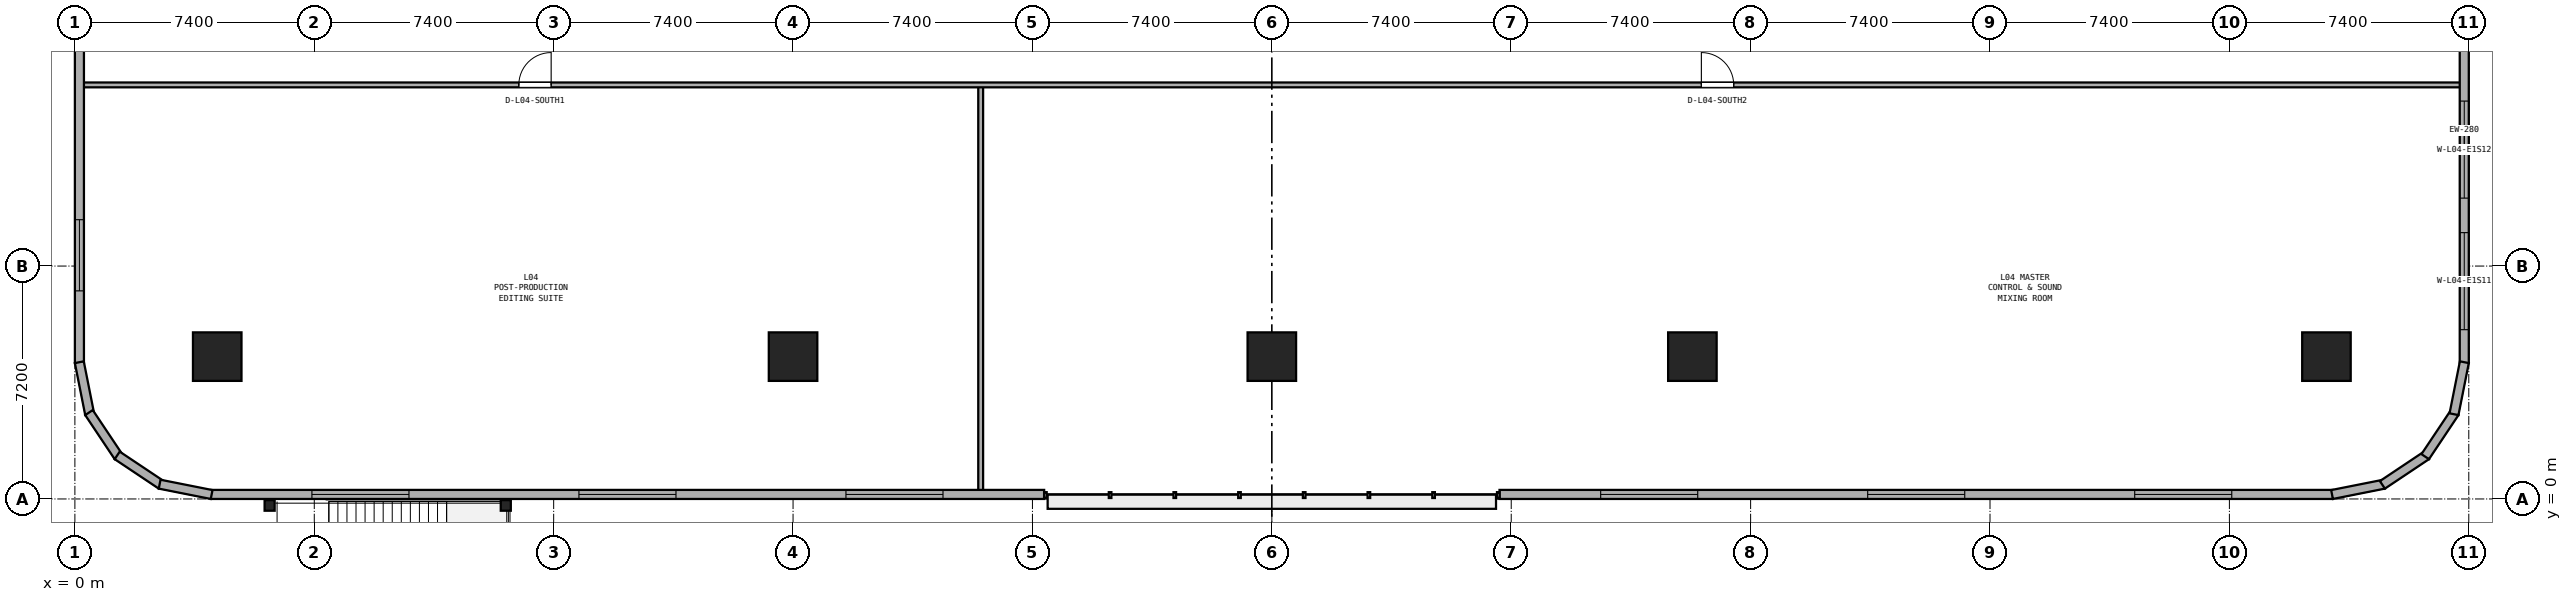
"""IFC4 building model, lengths in metres.
Left out: names, types, materials, properties, quantities, classifications, styles, units other than length and angle.
Written with IfcOpenShell. Run it as: python <this file> out.ifc"""

import sys

from ifc_helpers import new_model, si_unit, direction, frame, frame_2d, origin, origin_2d, place, context, subcontext, project, spatial, rectangle, i_section, extrude, element, fill, save


model = new_model("IFC4")
c1 = context("Model", 3, precision=1e-05, world=origin(), true_north=direction((0.0, 1.0)))
c2 = subcontext(c1, "Body", "Model", "MODEL_VIEW")
j1 = project(units=[si_unit("LENGTHUNIT", "METRE"), si_unit("PLANEANGLEUNIT", "RADIAN")], contexts=[c1])
p1 = place(None, origin())
s1 = spatial("IfcSite", under=j1, at=p1, CompositionType="ELEMENT")
p2 = place(p1, origin())
s2 = spatial("IfcBuilding", under=s1, at=p2, CompositionType="ELEMENT")
p3 = place(p2, frame((0.0, 0.0, 20.0)))
s3 = spatial("IfcBuildingStorey", under=s2, at=p3, CompositionType="ELEMENT", Elevation=20.0)
for number, where, z_axis, x_axis in (
    (1, (4.4, 4.4, 0.0), (0.0, 0.0, 1.0), (1.0, 0.0, 0.0)),
    (2, (22.2, 4.4, 0.0), (0.0, 0.0, 1.0), (1.0, 0.0, 0.0)),
    (3, (37.0, 4.4, 0.0), (0.0, 0.0, 1.0), (1.0, 0.0, 0.0)),
    (4, (50.0, 4.4, 0.0), (0.0, 0.0, 1.0), (1.0, 0.0, 0.0)),
    (5, (69.6, 4.4, 0.0), (0.0, 0.0, 1.0), (1.0, 0.0, 0.0)),
):
    element("IfcColumn", number, at=place(p3, frame(where, z_axis=z_axis, x_axis=x_axis)), inside=s3, PredefinedType="COLUMN", context=c2, shape_type="SweptSolid", body=[
        extrude(rectangle(XDim=1.5, YDim=1.5, at=origin_2d()), origin(), (0.0, 0.0, 1.0), 5.0),
    ])
for number, where, z_axis, x_axis in (
    (6, (6.02, -0.2, 0.0), (0.0, 0.0, 1.0), (1.0, 0.0, 0.0)),
    (7, (13.32, -0.2, 0.0), (0.0, 0.0, 1.0), (1.0, 0.0, 0.0)),
):
    element("IfcColumn", number, at=place(p3, frame(where, z_axis=z_axis, x_axis=x_axis)), inside=s3, PredefinedType="COLUMN", context=c2, shape_type="SweptSolid", body=[
        extrude(i_section(OverallWidth=0.311, OverallDepth=0.327, WebThickness=0.016, FlangeThickness=0.025, at=origin_2d()), origin(), (0.0, 0.0, 1.0), 4.8),
    ])
p4 = place(p3, frame((28.0, 0.205, 0.0), z_axis=(0.0, 0.0, 1.0), x_axis=(0.0, 1.0, 0.0)))
e8 = element("IfcWall", 8, at=p4, inside=s3, PredefinedType="PARTITIONING", context=c2, shape_type="SweptSolid", body=[
    extrude(rectangle(XDim=12.595, YDim=0.15, at=frame_2d((6.297, 0.0))), origin(), (0.0, 0.0, 1.0), 2.2),
])
p5 = place(p3, frame((0.205, 12.8, 0.0), z_axis=(0.0, 0.0, 1.0), x_axis=(1.0, 0.0, 0.0)))
e9 = element("IfcWall", 9, at=p5, inside=s3, PredefinedType="PARTITIONING", context=c2, shape_type="SweptSolid", body=[
    extrude(rectangle(XDim=73.59, YDim=0.15, at=frame_2d((36.795, 0.0))), origin(), (0.0, 0.0, 1.0), 2.2),
])
p6 = place(p5, frame((13.518, 0.0, 0.0)))
e10 = element("IfcOpeningElement", 10, at=p6, cuts=e9, PredefinedType="OPENING", context=c2, shape_type="SweptSolid", body=[
    extrude(rectangle(XDim=1.0, YDim=2.12, at=frame_2d((0.5, 1.06))), frame((0.0, 0.085, 0.0), z_axis=(0.0, -1.0, 0.0), x_axis=(1.0, 0.0, 0.0)), (0.0, 0.0, 1.0), 0.17),
])
p7 = place(p5, frame((50.073, 0.0, 0.0)))
e11 = element("IfcOpeningElement", 11, at=p7, cuts=e9, PredefinedType="OPENING", context=c2, shape_type="SweptSolid", body=[
    extrude(rectangle(XDim=1.0, YDim=2.12, at=frame_2d((0.5, 1.06))), frame((0.0, 0.085, 0.0), z_axis=(0.0, -1.0, 0.0), x_axis=(1.0, 0.0, 0.0)), (0.0, 0.0, 1.0), 0.17),
])
p8 = place(p3, frame((73.86, 4.2, 0.0), z_axis=(0.0, 0.0, 1.0), x_axis=(0.0, 1.0, 0.0)))
e12 = element("IfcWall", 12, at=p8, inside=s3, PredefinedType="STANDARD", context=c2, shape_type="SweptSolid", body=[
    extrude(rectangle(XDim=13.2, YDim=0.28, at=frame_2d((6.6, 0.0))), origin(), (0.0, 0.0, 1.0), 3.7),
])
p9 = place(p8, frame((1.033, 0.0, 0.9)))
e13 = element("IfcOpeningElement", 13, at=p9, cuts=e12, PredefinedType="OPENING", context=c2, shape_type="SweptSolid", body=[
    extrude(rectangle(XDim=3.0, YDim=2.2, at=frame_2d((1.5, 1.1))), frame((0.0, 0.15, 0.0), z_axis=(0.0, -1.0, 0.0), x_axis=(1.0, 0.0, 0.0)), (0.0, 0.0, 1.0), 0.3),
])
p10 = place(p8, frame((5.1, 0.0, 0.9)))
e14 = element("IfcOpeningElement", 14, at=p10, cuts=e12, PredefinedType="OPENING", context=c2, shape_type="SweptSolid", body=[
    extrude(rectangle(XDim=3.0, YDim=2.2, at=frame_2d((1.5, 1.1))), frame((0.0, 0.15, 0.0), z_axis=(0.0, -1.0, 0.0), x_axis=(1.0, 0.0, 0.0)), (0.0, 0.0, 1.0), 0.3),
])
p11 = place(p3, frame((0.14, 22.2, 0.0), z_axis=(0.0, 0.0, 1.0), x_axis=(0.0, -1.0, 0.0)))
e15 = element("IfcWall", 15, at=p11, inside=s3, PredefinedType="STANDARD", context=c2, shape_type="SweptSolid", body=[
    extrude(rectangle(XDim=18.0, YDim=0.28, at=frame_2d((9.0, 0.0))), origin(), (0.0, 0.0, 1.0), 3.7),
])
p12 = place(p11, frame((2.233, 0.0, 0.9)))
e16 = element("IfcOpeningElement", 16, at=p12, cuts=e15, PredefinedType="OPENING", context=c2, shape_type="SweptSolid", body=[
    extrude(rectangle(XDim=2.2, YDim=1.95, at=frame_2d((1.1, 0.975))), frame((0.0, 0.15, 0.0), z_axis=(0.0, -1.0, 0.0), x_axis=(1.0, 0.0, 0.0)), (0.0, 0.0, 1.0), 0.3),
])
p13 = place(p11, frame((13.567, 0.0, 0.9)))
e17 = element("IfcOpeningElement", 17, at=p13, cuts=e15, PredefinedType="OPENING", context=c2, shape_type="SweptSolid", body=[
    extrude(rectangle(XDim=2.2, YDim=1.95, at=frame_2d((1.1, 0.975))), frame((0.0, 0.15, 0.0), z_axis=(0.0, -1.0, 0.0), x_axis=(1.0, 0.0, 0.0)), (0.0, 0.0, 1.0), 0.3),
])
p14 = place(p3, frame((4.2, 0.14, 0.0), z_axis=(0.0, 0.0, 1.0), x_axis=(1.0, 0.0, 0.0)))
e18 = element("IfcWall", 18, at=p14, inside=s3, PredefinedType="STANDARD", context=c2, shape_type="SweptSolid", body=[
    extrude(rectangle(XDim=25.762, YDim=0.28, at=frame_2d((12.881, 0.0))), origin(), (0.0, 0.0, 1.0), 4.6),
])
p15 = place(p14, frame((3.127, 0.0, 0.9)))
e19 = element("IfcOpeningElement", 19, at=p15, cuts=e18, PredefinedType="OPENING", context=c2, shape_type="SweptSolid", body=[
    extrude(rectangle(XDim=3.0, YDim=2.2, at=frame_2d((1.5, 1.1))), frame((0.0, 0.15, 0.0), z_axis=(0.0, -1.0, 0.0), x_axis=(1.0, 0.0, 0.0)), (0.0, 0.0, 1.0), 0.3),
])
p16 = place(p14, frame((11.381, 0.0, 0.9)))
e20 = element("IfcOpeningElement", 20, at=p16, cuts=e18, PredefinedType="OPENING", context=c2, shape_type="SweptSolid", body=[
    extrude(rectangle(XDim=3.0, YDim=2.2, at=frame_2d((1.5, 1.1))), frame((0.0, 0.15, 0.0), z_axis=(0.0, -1.0, 0.0), x_axis=(1.0, 0.0, 0.0)), (0.0, 0.0, 1.0), 0.3),
])
p17 = place(p14, frame((19.635, 0.0, 0.9)))
e21 = element("IfcOpeningElement", 21, at=p17, cuts=e18, PredefinedType="OPENING", context=c2, shape_type="SweptSolid", body=[
    extrude(rectangle(XDim=3.0, YDim=2.2, at=frame_2d((1.5, 1.1))), frame((0.0, 0.15, 0.0), z_axis=(0.0, -1.0, 0.0), x_axis=(1.0, 0.0, 0.0)), (0.0, 0.0, 1.0), 0.3),
])
p18 = place(p3, frame((44.038, 0.14, 0.0), z_axis=(0.0, 0.0, 1.0), x_axis=(1.0, 0.0, 0.0)))
e22 = element("IfcWall", 22, at=p18, inside=s3, PredefinedType="STANDARD", context=c2, shape_type="SweptSolid", body=[
    extrude(rectangle(XDim=25.762, YDim=0.28, at=frame_2d((12.881, 0.0))), origin(), (0.0, 0.0, 1.0), 4.6),
])
p19 = place(p18, frame((3.127, 0.0, 0.9)))
e23 = element("IfcOpeningElement", 23, at=p19, cuts=e22, PredefinedType="OPENING", context=c2, shape_type="SweptSolid", body=[
    extrude(rectangle(XDim=3.0, YDim=2.2, at=frame_2d((1.5, 1.1))), frame((0.0, 0.15, 0.0), z_axis=(0.0, -1.0, 0.0), x_axis=(1.0, 0.0, 0.0)), (0.0, 0.0, 1.0), 0.3),
])
p20 = place(p18, frame((11.381, 0.0, 0.9)))
e24 = element("IfcOpeningElement", 24, at=p20, cuts=e22, PredefinedType="OPENING", context=c2, shape_type="SweptSolid", body=[
    extrude(rectangle(XDim=3.0, YDim=2.2, at=frame_2d((1.5, 1.1))), frame((0.0, 0.15, 0.0), z_axis=(0.0, -1.0, 0.0), x_axis=(1.0, 0.0, 0.0)), (0.0, 0.0, 1.0), 0.3),
])
p21 = place(p18, frame((19.635, 0.0, 0.9)))
e25 = element("IfcOpeningElement", 25, at=p21, cuts=e22, PredefinedType="OPENING", context=c2, shape_type="SweptSolid", body=[
    extrude(rectangle(XDim=3.0, YDim=2.2, at=frame_2d((1.5, 1.1))), frame((0.0, 0.15, 0.0), z_axis=(0.0, -1.0, 0.0), x_axis=(1.0, 0.0, 0.0)), (0.0, 0.0, 1.0), 0.3),
])
for number, where, z_axis, x_axis in (
    (26, (0.137, 4.227, 0.0), (0.0, 0.0, 1.0), (0.195, -0.981, 0.0)),
    (27, (0.436, 2.67, 0.0), (0.0, 0.0, 1.0), (0.556, -0.831, 0.0)),
    (28, (1.308, 1.347, 0.0), (0.0, 0.0, 1.0), (0.831, -0.556, 0.0)),
    (29, (2.62, 0.457, 0.0), (0.0, 0.0, 1.0), (0.981, -0.195, 0.0)),
    (30, (69.773, 0.137, 0.0), (0.0, 0.0, 1.0), (0.981, 0.195, 0.0)),
    (31, (71.33, 0.436, 0.0), (0.0, 0.0, 1.0), (0.831, 0.556, 0.0)),
    (32, (72.653, 1.308, 0.0), (0.0, 0.0, 1.0), (0.556, 0.831, 0.0)),
    (33, (73.543, 2.62, 0.0), (0.0, 0.0, 1.0), (0.195, 0.981, 0.0)),
):
    element("IfcWall", number, at=place(p3, frame(where, z_axis=z_axis, x_axis=x_axis)), inside=s3, PredefinedType="STANDARD", context=c2, shape_type="SweptSolid", body=[
        extrude(rectangle(XDim=1.639, YDim=0.28, at=frame_2d((0.819, 0.0))), origin(), (0.0, 0.0, 1.0), 4.6),
    ])
p22 = place(p6, origin())
e34 = element("IfcDoor", 34, at=p22, inside=s3, OperationType="SINGLE_SWING_RIGHT", PredefinedType="DOOR", context=c2, shape_type="SweptSolid", body=[
    extrude(rectangle(XDim=1.0, YDim=2.12, at=frame_2d((0.5, 1.06))), frame((0.0, 0.025, 0.0), z_axis=(0.0, -1.0, 0.0), x_axis=(1.0, 0.0, 0.0)), (0.0, 0.0, 1.0), 0.05),
])
fill(e10, e34)
p23 = place(p7, origin())
e35 = element("IfcDoor", 35, at=p23, inside=s3, OperationType="SINGLE_SWING_LEFT", PredefinedType="DOOR", context=c2, shape_type="SweptSolid", body=[
    extrude(rectangle(XDim=1.0, YDim=2.12, at=frame_2d((0.5, 1.06))), frame((0.0, 0.025, 0.0), z_axis=(0.0, -1.0, 0.0), x_axis=(1.0, 0.0, 0.0)), (0.0, 0.0, 1.0), 0.05),
])
fill(e11, e35)
p24 = place(p9, origin())
e36 = element("IfcWindow", 36, at=p24, inside=s3, PartitioningType="SINGLE_PANEL", PredefinedType="WINDOW", context=c2, shape_type="SweptSolid", body=[
    extrude(rectangle(XDim=3.0, YDim=2.2, at=frame_2d((1.5, 1.1))), frame((0.0, 0.03, 0.0), z_axis=(0.0, -1.0, 0.0), x_axis=(1.0, 0.0, 0.0)), (0.0, 0.0, 1.0), 0.06),
])
fill(e13, e36)
p25 = place(p10, origin())
e37 = element("IfcWindow", 37, at=p25, inside=s3, PartitioningType="SINGLE_PANEL", PredefinedType="WINDOW", context=c2, shape_type="SweptSolid", body=[
    extrude(rectangle(XDim=3.0, YDim=2.2, at=frame_2d((1.5, 1.1))), frame((0.0, 0.03, 0.0), z_axis=(0.0, -1.0, 0.0), x_axis=(1.0, 0.0, 0.0)), (0.0, 0.0, 1.0), 0.06),
])
fill(e14, e37)
p26 = place(p13, origin())
e38 = element("IfcWindow", 38, at=p26, inside=s3, PartitioningType="SINGLE_PANEL", PredefinedType="WINDOW", context=c2, shape_type="SweptSolid", body=[
    extrude(rectangle(XDim=2.2, YDim=1.95, at=frame_2d((1.1, 0.975))), frame((0.0, 0.03, 0.0), z_axis=(0.0, -1.0, 0.0), x_axis=(1.0, 0.0, 0.0)), (0.0, 0.0, 1.0), 0.06),
])
fill(e17, e38)
p27 = place(p15, origin())
e39 = element("IfcWindow", 39, at=p27, inside=s3, PartitioningType="SINGLE_PANEL", PredefinedType="WINDOW", context=c2, shape_type="SweptSolid", body=[
    extrude(rectangle(XDim=3.0, YDim=2.2, at=frame_2d((1.5, 1.1))), frame((0.0, 0.03, 0.0), z_axis=(0.0, -1.0, 0.0), x_axis=(1.0, 0.0, 0.0)), (0.0, 0.0, 1.0), 0.06),
])
fill(e19, e39)
p28 = place(p16, origin())
e40 = element("IfcWindow", 40, at=p28, inside=s3, PartitioningType="SINGLE_PANEL", PredefinedType="WINDOW", context=c2, shape_type="SweptSolid", body=[
    extrude(rectangle(XDim=3.0, YDim=2.2, at=frame_2d((1.5, 1.1))), frame((0.0, 0.03, 0.0), z_axis=(0.0, -1.0, 0.0), x_axis=(1.0, 0.0, 0.0)), (0.0, 0.0, 1.0), 0.06),
])
fill(e20, e40)
p29 = place(p17, origin())
e41 = element("IfcWindow", 41, at=p29, inside=s3, PartitioningType="SINGLE_PANEL", PredefinedType="WINDOW", context=c2, shape_type="SweptSolid", body=[
    extrude(rectangle(XDim=3.0, YDim=2.2, at=frame_2d((1.5, 1.1))), frame((0.0, 0.03, 0.0), z_axis=(0.0, -1.0, 0.0), x_axis=(1.0, 0.0, 0.0)), (0.0, 0.0, 1.0), 0.06),
])
fill(e21, e41)
p30 = place(p19, origin())
e42 = element("IfcWindow", 42, at=p30, inside=s3, PartitioningType="SINGLE_PANEL", PredefinedType="WINDOW", context=c2, shape_type="SweptSolid", body=[
    extrude(rectangle(XDim=3.0, YDim=2.2, at=frame_2d((1.5, 1.1))), frame((0.0, 0.03, 0.0), z_axis=(0.0, -1.0, 0.0), x_axis=(1.0, 0.0, 0.0)), (0.0, 0.0, 1.0), 0.06),
])
fill(e23, e42)
p31 = place(p20, origin())
e43 = element("IfcWindow", 43, at=p31, inside=s3, PartitioningType="SINGLE_PANEL", PredefinedType="WINDOW", context=c2, shape_type="SweptSolid", body=[
    extrude(rectangle(XDim=3.0, YDim=2.2, at=frame_2d((1.5, 1.1))), frame((0.0, 0.03, 0.0), z_axis=(0.0, -1.0, 0.0), x_axis=(1.0, 0.0, 0.0)), (0.0, 0.0, 1.0), 0.06),
])
fill(e24, e43)
p32 = place(p21, origin())
e44 = element("IfcWindow", 44, at=p32, inside=s3, PartitioningType="SINGLE_PANEL", PredefinedType="WINDOW", context=c2, shape_type="SweptSolid", body=[
    extrude(rectangle(XDim=3.0, YDim=2.2, at=frame_2d((1.5, 1.1))), frame((0.0, 0.03, 0.0), z_axis=(0.0, -1.0, 0.0), x_axis=(1.0, 0.0, 0.0)), (0.0, 0.0, 1.0), 0.06),
])
fill(e25, e44)
save(model, sys.argv[1])
